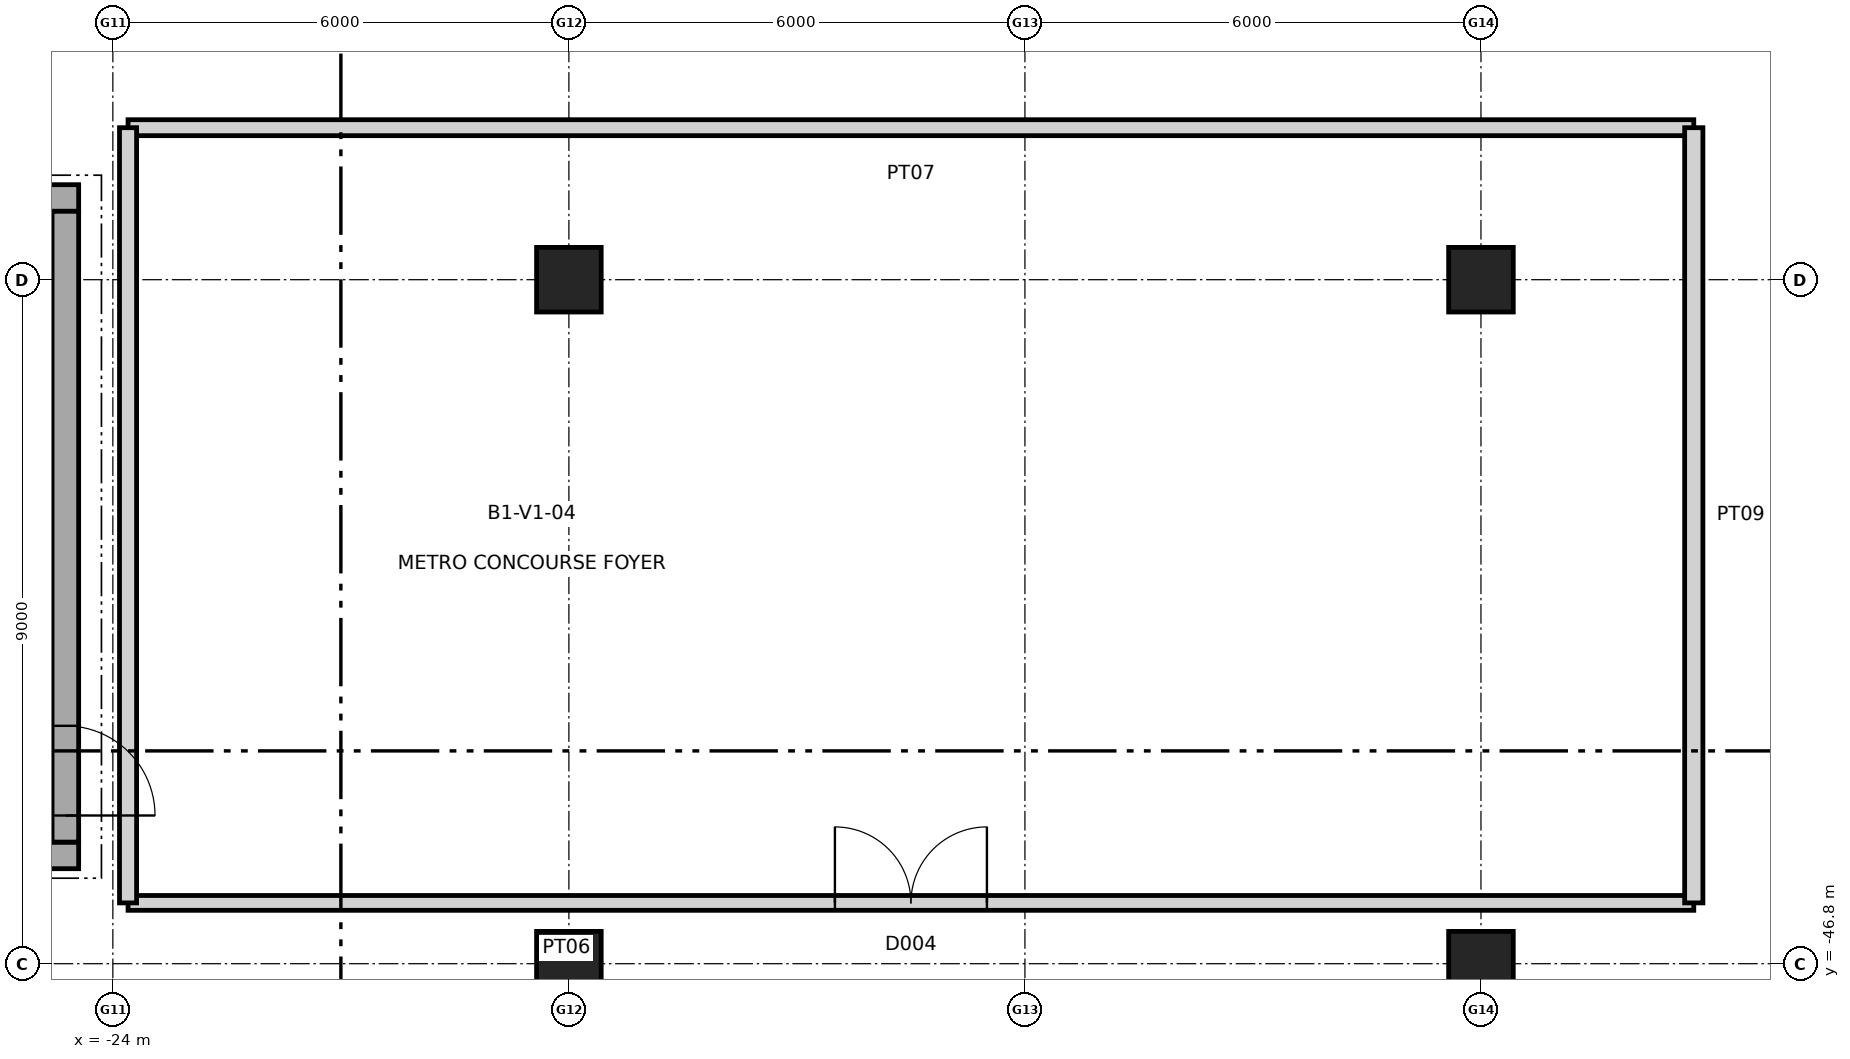
"""IFC4 building model, lengths in metres.
Left out: names, types, materials, properties, quantities, classifications, styles, units other than length and angle.
Written with IfcOpenShell. Run it as: python <this file> out.ifc"""

import sys

from ifc_helpers import new_model, si_unit, direction, frame, frame_2d, origin, origin_2d, place, context, subcontext, project, spatial, rectangle, circle, extrude, element, fill, save


model = new_model("IFC4")
c1 = context("Model", 3, precision=1e-05, world=origin(), true_north=direction((0.0, 1.0)))
c2 = subcontext(c1, "Body", "Model", "MODEL_VIEW")
j1 = project(units=[si_unit("LENGTHUNIT", "METRE"), si_unit("PLANEANGLEUNIT", "RADIAN")], contexts=[c1])
p1 = place(None, origin())
s1 = spatial("IfcSite", under=j1, at=p1, CompositionType="ELEMENT")
p2 = place(p1, origin())
s2 = spatial("IfcBuilding", under=s1, at=p2, CompositionType="ELEMENT")
p3 = place(p2, frame((0.0, 0.0, -5.4)))
s3 = spatial("IfcBuildingStorey", under=s2, at=p3, CompositionType="ELEMENT", Elevation=-5.4)
for number, where, z_axis, x_axis in (
    (1, (-18.0, -46.8, 0.0), (0.0, 0.0, 1.0), (1.0, 0.0, 0.0)),
    (2, (-18.0, -37.8, 0.0), (0.0, 0.0, 1.0), (1.0, 0.0, 0.0)),
    (3, (-6.0, -46.8, 0.0), (0.0, 0.0, 1.0), (1.0, 0.0, 0.0)),
    (4, (-6.0, -37.8, 0.0), (0.0, 0.0, 1.0), (1.0, 0.0, 0.0)),
):
    element("IfcColumn", number, at=place(p3, frame(where, z_axis=z_axis, x_axis=x_axis)), inside=s3, PredefinedType="COLUMN", context=c2, shape_type="SweptSolid", body=[
        extrude(circle(Radius=0.425, at=origin_2d()), origin(), (0.0, 0.0, 1.0), 5.4),
    ])
for number, where, z_axis, x_axis in (
    (5, (-24.45, -45.375, 0.0), (0.0, 0.0, 1.0), (-1.0, 0.0, 0.0)),
    (6, (-29.05, -36.725, 0.0), (0.0, 0.0, 1.0), (1.0, 0.0, 0.0)),
):
    element("IfcWall", number, at=place(p3, frame(where, z_axis=z_axis, x_axis=x_axis)), inside=s3, PredefinedType="SHEAR", context=c2, shape_type="SweptSolid", body=[
        extrude(rectangle(XDim=4.6, YDim=0.35, at=frame_2d((2.3, 0.0))), origin(), (0.0, 0.0, 1.0), 5.4),
    ])
p4 = place(p3, frame((-24.625, -36.9, 0.0), z_axis=(0.0, 0.0, 1.0), x_axis=(0.0, -1.0, 0.0)))
e7 = element("IfcWall", 7, at=p4, inside=s3, PredefinedType="SHEAR", context=c2, shape_type="SweptSolid", body=[
    extrude(rectangle(XDim=8.3, YDim=0.35, at=frame_2d((4.15, 0.0))), origin(), (0.0, 0.0, 1.0), 5.4),
])
p5 = place(p4, frame((6.77, 0.0, 0.0)))
e8 = element("IfcOpeningElement", 8, at=p5, cuts=e7, PredefinedType="OPENING", context=c2, shape_type="SweptSolid", body=[
    extrude(rectangle(XDim=1.18, YDim=2.15, at=frame_2d((0.59, 1.075))), frame((0.0, 0.185, 0.0), z_axis=(0.0, -1.0, 0.0), x_axis=(1.0, 0.0, 0.0)), (0.0, 0.0, 1.0), 0.37),
])
p6 = place(p3, frame((-23.8, -46.0, 0.0), z_axis=(0.0, 0.0, 1.0), x_axis=(1.0, 0.0, 0.0)))
e9 = element("IfcWall", 9, at=p6, inside=s3, PredefinedType="PARTITIONING", context=c2, shape_type="SweptSolid", body=[
    extrude(rectangle(XDim=20.6, YDim=0.195, at=frame_2d((10.3, 0.0))), origin(), (0.0, 0.0, 1.0), 5.02),
])
p7 = place(p6, frame((9.3, 0.0, 0.0)))
e10 = element("IfcOpeningElement", 10, at=p7, cuts=e9, PredefinedType="OPENING", context=c2, shape_type="SweptSolid", body=[
    extrude(rectangle(XDim=2.0, YDim=2.35, at=frame_2d((1.0, 1.175))), frame((0.0, 0.107, 0.0), z_axis=(0.0, -1.0, 0.0), x_axis=(1.0, 0.0, 0.0)), (0.0, 0.0, 1.0), 0.215),
])
p8 = place(p3, frame((-23.8, -35.8, 0.0), z_axis=(0.0, 0.0, 1.0), x_axis=(1.0, 0.0, 0.0)))
e11 = element("IfcWall", 11, at=p8, inside=s3, PredefinedType="PARTITIONING", context=c2, shape_type="SweptSolid", body=[
    extrude(rectangle(XDim=20.6, YDim=0.21, at=frame_2d((10.3, 0.0))), origin(), (0.0, 0.0, 1.0), 5.02),
])
p9 = place(p3, frame((-23.8, -46.0, 0.0), z_axis=(0.0, 0.0, 1.0), x_axis=(0.0, 1.0, 0.0)))
e12 = element("IfcWall", 12, at=p9, inside=s3, PredefinedType="PARTITIONING", context=c2, shape_type="SweptSolid", body=[
    extrude(rectangle(XDim=10.2, YDim=0.225, at=frame_2d((5.1, 0.0))), origin(), (0.0, 0.0, 1.0), 5.02),
])
p10 = place(p3, frame((-3.2, -46.0, 0.0), z_axis=(0.0, 0.0, 1.0), x_axis=(0.0, 1.0, 0.0)))
e13 = element("IfcWall", 13, at=p10, inside=s3, PredefinedType="PARTITIONING", context=c2, shape_type="SweptSolid", body=[
    extrude(rectangle(XDim=10.2, YDim=0.24, at=frame_2d((5.1, 0.0))), origin(), (0.0, 0.0, 1.0), 5.02),
])
p11 = place(p5, origin())
e14 = element("IfcDoor", 14, at=p11, inside=s3, OperationType="SINGLE_SWING_RIGHT", PredefinedType="DOOR", context=c2, shape_type="SweptSolid", body=[
    extrude(rectangle(XDim=1.18, YDim=2.15, at=frame_2d((0.59, 1.075))), frame((0.0, 0.025, 0.0), z_axis=(0.0, -1.0, 0.0), x_axis=(1.0, 0.0, 0.0)), (0.0, 0.0, 1.0), 0.05),
])
fill(e8, e14)
p12 = place(p7, origin())
e15 = element("IfcDoor", 15, at=p12, inside=s3, OperationType="DOUBLE_DOOR_SINGLE_SWING", PredefinedType="DOOR", context=c2, shape_type="SweptSolid", body=[
    extrude(rectangle(XDim=2.0, YDim=2.35, at=frame_2d((1.0, 1.175))), frame((0.0, 0.025, 0.0), z_axis=(0.0, -1.0, 0.0), x_axis=(1.0, 0.0, 0.0)), (0.0, 0.0, 1.0), 0.05),
])
fill(e10, e15)
save(model, sys.argv[1])
